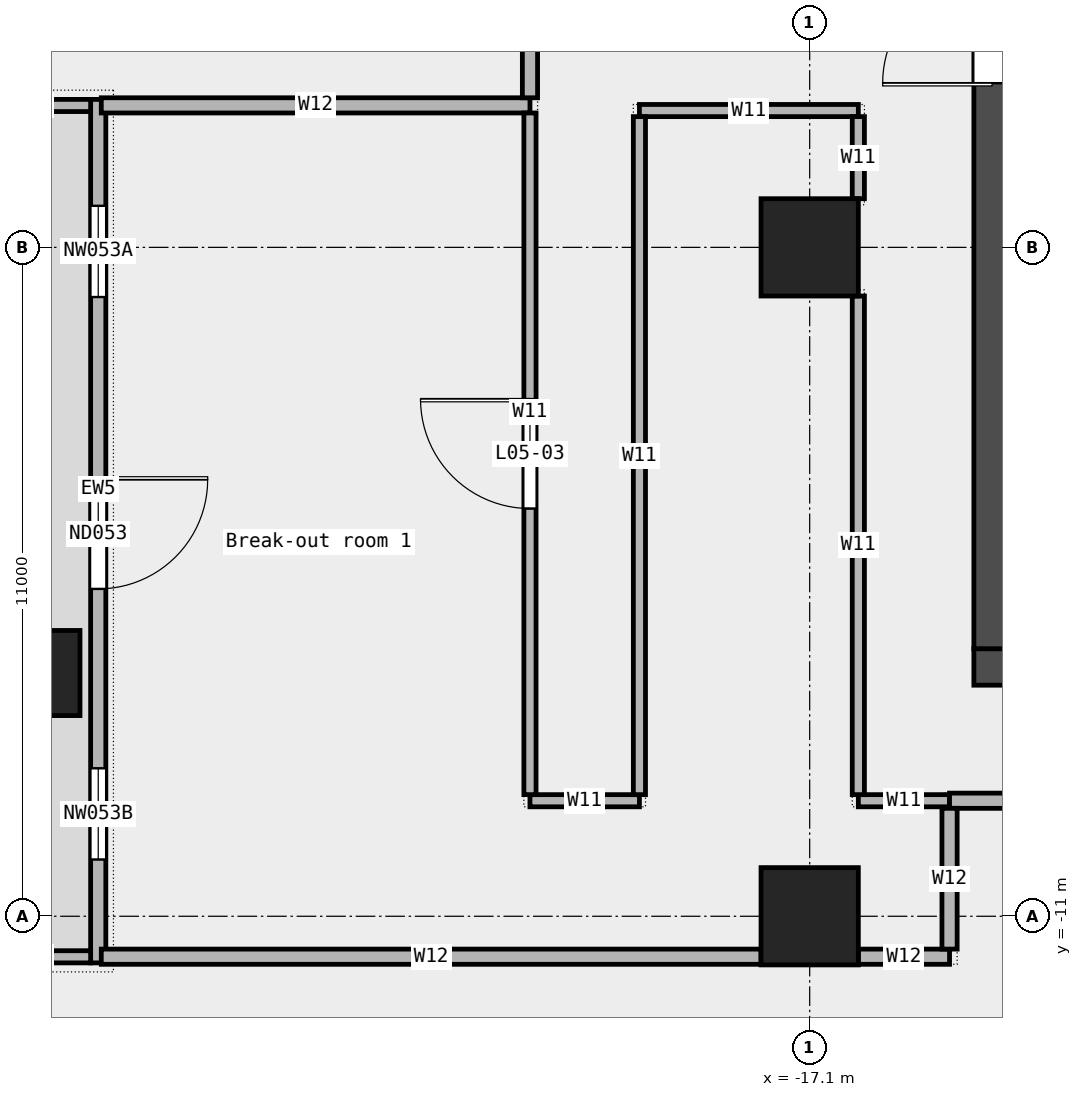
"""IFC4 building model, lengths in metres.
Left out: names, types, materials, properties, quantities, classifications, styles, units other than length and angle.
Written with IfcOpenShell. Run it as: python <this file> out.ifc"""

import sys

from ifc_helpers import new_model, si_unit, direction, frame, frame_2d, origin, origin_2d, place, context, subcontext, project, spatial, rectangle, extrude, element, fill, save


model = new_model("IFC4")
c1 = context("Model", 3, precision=1e-05, world=origin(), true_north=direction((0.0, 1.0)))
c2 = subcontext(c1, "Body", "Model", "MODEL_VIEW")
j1 = project(units=[si_unit("LENGTHUNIT", "METRE"), si_unit("PLANEANGLEUNIT", "RADIAN")], contexts=[c1])
p1 = place(None, origin())
s1 = spatial("IfcSite", under=j1, at=p1, CompositionType="ELEMENT")
p2 = place(p1, origin())
s2 = spatial("IfcBuilding", under=s1, at=p2, CompositionType="ELEMENT")
p3 = place(p2, frame((0.0, 0.0, 31.0)))
s3 = spatial("IfcBuildingStorey", under=s2, at=p3, CompositionType="ELEMENT", Elevation=31.0)
p4 = place(p3, frame((-29.8, -7.0, 0.0), z_axis=(0.0, 0.0, 1.0), x_axis=(1.0, 0.0, 0.0)))
e1 = element("IfcColumn", 1, at=p4, inside=s3, PredefinedType="COLUMN", context=c2, shape_type="SweptSolid", body=[
    extrude(rectangle(XDim=1.4, YDim=1.4, at=origin_2d()), origin(), (0.0, 0.0, 1.0), 4.35),
])
for number, where, z_axis, x_axis in (
    (2, (-17.1, -11.0, 0.0), (0.0, 0.0, 1.0), (1.0, 0.0, 0.0)),
    (3, (-17.1, 0.0, 0.0), (0.0, 0.0, 1.0), (1.0, 0.0, 0.0)),
):
    element("IfcColumn", number, at=place(p3, frame(where, z_axis=z_axis, x_axis=x_axis)), inside=s3, PredefinedType="COLUMN", context=c2, shape_type="SweptSolid", body=[
        extrude(rectangle(XDim=1.6, YDim=1.6, at=origin_2d()), origin(), (0.0, 0.0, 1.0), 4.35),
    ])
p5 = place(p3, frame((-28.8, 2.433, 0.0), z_axis=(0.0, 0.0, 1.0), x_axis=(0.0, -1.0, 0.0)))
e4 = element("IfcWall", 4, at=p5, inside=s3, PredefinedType="STANDARD", context=c2, shape_type="SweptSolid", body=[
    extrude(rectangle(XDim=14.2, YDim=0.25, at=frame_2d((7.1, 0.0))), origin(), (0.0, 0.0, 1.0), 4.35),
])
p6 = place(p5, frame((1.75, 0.0, 0.45)))
e5 = element("IfcOpeningElement", 5, at=p6, cuts=e4, PredefinedType="OPENING", context=c2, shape_type="SweptSolid", body=[
    extrude(rectangle(XDim=1.5, YDim=3.0, at=frame_2d((0.75, 1.5))), frame((0.0, 0.137, 0.0), z_axis=(0.0, -1.0, 0.0), x_axis=(1.0, 0.0, 0.0)), (0.0, 0.0, 1.0), 0.274),
])
p7 = place(p5, frame((6.25, 0.0, 0.0)))
e6 = element("IfcOpeningElement", 6, at=p7, cuts=e4, PredefinedType="OPENING", context=c2, shape_type="SweptSolid", body=[
    extrude(rectangle(XDim=1.8, YDim=2.4, at=frame_2d((0.9, 1.2))), frame((0.0, 0.137, 0.0), z_axis=(0.0, -1.0, 0.0), x_axis=(1.0, 0.0, 0.0)), (0.0, 0.0, 1.0), 0.274),
])
p8 = place(p5, frame((11.0, 0.0, 0.45)))
e7 = element("IfcOpeningElement", 7, at=p8, cuts=e4, PredefinedType="OPENING", context=c2, shape_type="SweptSolid", body=[
    extrude(rectangle(XDim=1.5, YDim=3.0, at=frame_2d((0.75, 1.5))), frame((0.0, 0.137, 0.0), z_axis=(0.0, -1.0, 0.0), x_axis=(1.0, 0.0, 0.0)), (0.0, 0.0, 1.0), 0.274),
])
for number, where, z_axis, x_axis in (
    (8, (-30.8, 2.333, 0.0), (0.0, 0.0, 1.0), (1.0, 0.0, 0.0)),
    (9, (-30.8, -11.667, 0.0), (0.0, 0.0, 1.0), (1.0, 0.0, 0.0)),
):
    element("IfcWall", number, at=place(p3, frame(where, z_axis=z_axis, x_axis=x_axis)), inside=s3, PredefinedType="STANDARD", context=c2, shape_type="SweptSolid", body=[
        extrude(rectangle(XDim=1.875, YDim=0.2, at=frame_2d((0.938, 0.0))), origin(), (0.0, 0.0, 1.0), 4.35),
    ])
p9 = place(p3, frame((-28.75, -11.665, 0.0), z_axis=(0.0, 0.0, 1.0), x_axis=(1.0, 0.0, 0.0)))
e10 = element("IfcWall", 10, at=p9, inside=s3, PredefinedType="PARTITIONING", context=c2, shape_type="SweptSolid", body=[
    extrude(rectangle(XDim=10.85, YDim=0.25, at=frame_2d((5.425, 0.0))), origin(), (0.0, 0.0, 1.0), 4.35),
])
p10 = place(p3, frame((-16.3, -11.665, 0.0), z_axis=(0.0, 0.0, 1.0), x_axis=(1.0, 0.0, 0.0)))
e11 = element("IfcWall", 11, at=p10, inside=s3, PredefinedType="PARTITIONING", context=c2, shape_type="SweptSolid", body=[
    extrude(rectangle(XDim=1.5, YDim=0.25, at=frame_2d((0.75, 0.0))), origin(), (0.0, 0.0, 1.0), 4.35),
])
p11 = place(p3, frame((-21.7, -9.1, 0.0), z_axis=(0.0, 0.0, 1.0), x_axis=(1.0, 0.0, 0.0)))
e12 = element("IfcWall", 12, at=p11, inside=s3, PredefinedType="PARTITIONING", context=c2, shape_type="SweptSolid", body=[
    extrude(rectangle(XDim=1.8, YDim=0.2, at=frame_2d((0.9, 0.0))), origin(), (0.0, 0.0, 1.0), 4.35),
])
p12 = place(p3, frame((-16.3, -9.1, 0.0), z_axis=(0.0, 0.0, 1.0), x_axis=(1.0, 0.0, 0.0)))
e13 = element("IfcWall", 13, at=p12, inside=s3, PredefinedType="PARTITIONING", context=c2, shape_type="SweptSolid", body=[
    extrude(rectangle(XDim=1.5, YDim=0.2, at=frame_2d((0.75, 0.0))), origin(), (0.0, 0.0, 1.0), 4.35),
])
p13 = place(p3, frame((-14.8, -9.1, 0.0), z_axis=(0.0, 0.0, 1.0), x_axis=(1.0, 0.0, 0.0)))
e14 = element("IfcWall", 14, at=p13, inside=s3, PredefinedType="PARTITIONING", context=c2, shape_type="SweptSolid", body=[
    extrude(rectangle(XDim=29.6, YDim=0.25, at=frame_2d((14.8, 0.0))), origin(), (0.0, 0.0, 1.0), 4.35),
])
p14 = place(p13, frame((22.998, 0.0, 0.0)))
e15 = element("IfcOpeningElement", 15, at=p14, cuts=e14, PredefinedType="OPENING", context=c2, shape_type="SweptSolid", body=[
    extrude(rectangle(XDim=1.8, YDim=2.1, at=frame_2d((0.9, 1.05))), frame((0.0, 0.137, 0.0), z_axis=(0.0, -1.0, 0.0), x_axis=(1.0, 0.0, 0.0)), (0.0, 0.0, 1.0), 0.274),
])
p15 = place(p13, frame((9.998, 0.0, 0.0)))
e16 = element("IfcOpeningElement", 16, at=p15, cuts=e14, PredefinedType="OPENING", context=c2, shape_type="SweptSolid", body=[
    extrude(rectangle(XDim=1.8, YDim=2.1, at=frame_2d((0.9, 1.05))), frame((0.0, 0.137, 0.0), z_axis=(0.0, -1.0, 0.0), x_axis=(1.0, 0.0, 0.0)), (0.0, 0.0, 1.0), 0.274),
])
p16 = place(p3, frame((-19.9, 2.25, 0.0), z_axis=(0.0, 0.0, 1.0), x_axis=(1.0, 0.0, 0.0)))
e17 = element("IfcWall", 17, at=p16, inside=s3, PredefinedType="PARTITIONING", context=c2, shape_type="SweptSolid", body=[
    extrude(rectangle(XDim=3.6, YDim=0.2, at=frame_2d((1.8, 0.0))), origin(), (0.0, 0.0, 1.0), 4.35),
])
p17 = place(p3, frame((-28.75, 2.335, 0.0), z_axis=(0.0, 0.0, 1.0), x_axis=(1.0, 0.0, 0.0)))
e18 = element("IfcWall", 18, at=p17, inside=s3, PredefinedType="PARTITIONING", context=c2, shape_type="SweptSolid", body=[
    extrude(rectangle(XDim=7.05, YDim=0.25, at=frame_2d((3.525, 0.0))), origin(), (0.0, 0.0, 1.0), 4.35),
])
p18 = place(p3, frame((-21.7, -9.0, 0.0), z_axis=(0.0, 0.0, 1.0), x_axis=(0.0, 1.0, 0.0)))
e19 = element("IfcWall", 19, at=p18, inside=s3, PredefinedType="PARTITIONING", context=c2, shape_type="SweptSolid", body=[
    extrude(rectangle(XDim=11.21, YDim=0.2, at=frame_2d((5.605, 0.0))), origin(), (0.0, 0.0, 1.0), 4.35),
])
p19 = place(p18, frame((4.705, 0.0, 0.0)))
e20 = element("IfcOpeningElement", 20, at=p19, cuts=e19, PredefinedType="OPENING", context=c2, shape_type="SweptSolid", body=[
    extrude(rectangle(XDim=1.8, YDim=2.1, at=frame_2d((0.9, 1.05))), frame((0.0, 0.112, 0.0), z_axis=(0.0, -1.0, 0.0), x_axis=(1.0, 0.0, 0.0)), (0.0, 0.0, 1.0), 0.224),
])
p20 = place(p3, frame((-21.7, 2.46, 0.0), z_axis=(0.0, 0.0, 1.0), x_axis=(0.0, 1.0, 0.0)))
e21 = element("IfcWall", 21, at=p20, inside=s3, PredefinedType="PARTITIONING", context=c2, shape_type="SweptSolid", body=[
    extrude(rectangle(XDim=12.79, YDim=0.25, at=frame_2d((6.395, 0.0))), origin(), (0.0, 0.0, 1.0), 4.35),
])
p21 = place(p20, frame((5.495, 0.0, 0.0)))
e22 = element("IfcOpeningElement", 22, at=p21, cuts=e21, PredefinedType="OPENING", context=c2, shape_type="SweptSolid", body=[
    extrude(rectangle(XDim=1.8, YDim=2.1, at=frame_2d((0.9, 1.05))), frame((0.0, 0.137, 0.0), z_axis=(0.0, -1.0, 0.0), x_axis=(1.0, 0.0, 0.0)), (0.0, 0.0, 1.0), 0.274),
])
p22 = place(p3, frame((-19.9, -9.0, 0.0), z_axis=(0.0, 0.0, 1.0), x_axis=(0.0, 1.0, 0.0)))
e23 = element("IfcWall", 23, at=p22, inside=s3, PredefinedType="PARTITIONING", context=c2, shape_type="SweptSolid", body=[
    extrude(rectangle(XDim=11.15, YDim=0.2, at=frame_2d((5.575, 0.0))), origin(), (0.0, 0.0, 1.0), 4.35),
])
p23 = place(p3, frame((-16.3, -9.0, 0.0), z_axis=(0.0, 0.0, 1.0), x_axis=(0.0, 1.0, 0.0)))
e24 = element("IfcWall", 24, at=p23, inside=s3, PredefinedType="PARTITIONING", context=c2, shape_type="SweptSolid", body=[
    extrude(rectangle(XDim=8.2, YDim=0.2, at=frame_2d((4.1, 0.0))), origin(), (0.0, 0.0, 1.0), 4.35),
])
p24 = place(p3, frame((-16.3, 0.8, 0.0), z_axis=(0.0, 0.0, 1.0), x_axis=(0.0, 1.0, 0.0)))
e25 = element("IfcWall", 25, at=p24, inside=s3, PredefinedType="PARTITIONING", context=c2, shape_type="SweptSolid", body=[
    extrude(rectangle(XDim=1.35, YDim=0.2, at=frame_2d((0.675, 0.0))), origin(), (0.0, 0.0, 1.0), 4.35),
])
p25 = place(p3, frame((-14.8, -11.54, 0.0), z_axis=(0.0, 0.0, 1.0), x_axis=(0.0, 1.0, 0.0)))
e26 = element("IfcWall", 26, at=p25, inside=s3, PredefinedType="PARTITIONING", context=c2, shape_type="SweptSolid", body=[
    extrude(rectangle(XDim=2.315, YDim=0.25, at=frame_2d((1.157, 0.0))), origin(), (0.0, 0.0, 1.0), 4.35),
])
p26 = place(p3, frame((-14.4, -6.9, 0.0), z_axis=(0.0, 0.0, 1.0), x_axis=(1.0, 0.0, 0.0)))
e27 = element("IfcWall", 27, at=p26, inside=s3, PredefinedType="SHEAR", context=c2, shape_type="SweptSolid", body=[
    extrude(rectangle(XDim=28.8, YDim=0.6, at=frame_2d((14.4, 0.0))), origin(), (0.0, 0.0, 1.0), 4.5),
])
p27 = place(p26, frame((4.337, 0.0, 0.0)))
e28 = element("IfcOpeningElement", 28, at=p27, cuts=e27, PredefinedType="OPENING", context=c2, shape_type="SweptSolid", body=[
    extrude(rectangle(XDim=1.0, YDim=2.1, at=frame_2d((0.5, 1.05))), frame((0.0, 0.312, 0.0), z_axis=(0.0, -1.0, 0.0), x_axis=(1.0, 0.0, 0.0)), (0.0, 0.0, 1.0), 0.624),
])
p28 = place(p26, frame((6.212, 0.0, 0.0)))
e29 = element("IfcOpeningElement", 29, at=p28, cuts=e27, PredefinedType="OPENING", context=c2, shape_type="SweptSolid", body=[
    extrude(rectangle(XDim=1.0, YDim=2.1, at=frame_2d((0.5, 1.05))), frame((0.0, 0.312, 0.0), z_axis=(0.0, -1.0, 0.0), x_axis=(1.0, 0.0, 0.0)), (0.0, 0.0, 1.0), 0.624),
])
p29 = place(p26, frame((10.8, 0.0, 0.0)))
e30 = element("IfcOpeningElement", 30, at=p29, cuts=e27, PredefinedType="OPENING", context=c2, shape_type="SweptSolid", body=[
    extrude(rectangle(XDim=1.2, YDim=2.1, at=frame_2d((0.6, 1.05))), frame((0.0, 0.312, 0.0), z_axis=(0.0, -1.0, 0.0), x_axis=(1.0, 0.0, 0.0)), (0.0, 0.0, 1.0), 0.624),
])
p30 = place(p26, frame((15.587, 0.0, 0.0)))
e31 = element("IfcOpeningElement", 31, at=p30, cuts=e27, PredefinedType="OPENING", context=c2, shape_type="SweptSolid", body=[
    extrude(rectangle(XDim=1.0, YDim=2.1, at=frame_2d((0.5, 1.05))), frame((0.0, 0.312, 0.0), z_axis=(0.0, -1.0, 0.0), x_axis=(1.0, 0.0, 0.0)), (0.0, 0.0, 1.0), 0.624),
])
p31 = place(p26, frame((18.75, 0.0, 0.0)))
e32 = element("IfcOpeningElement", 32, at=p31, cuts=e27, PredefinedType="OPENING", context=c2, shape_type="SweptSolid", body=[
    extrude(rectangle(XDim=1.8, YDim=2.1, at=frame_2d((0.9, 1.05))), frame((0.0, 0.312, 0.0), z_axis=(0.0, -1.0, 0.0), x_axis=(1.0, 0.0, 0.0)), (0.0, 0.0, 1.0), 0.624),
])
p32 = place(p26, frame((23.087, 0.0, 0.0)))
e33 = element("IfcOpeningElement", 33, at=p32, cuts=e27, PredefinedType="OPENING", context=c2, shape_type="SweptSolid", body=[
    extrude(rectangle(XDim=1.0, YDim=2.1, at=frame_2d((0.5, 1.05))), frame((0.0, 0.312, 0.0), z_axis=(0.0, -1.0, 0.0), x_axis=(1.0, 0.0, 0.0)), (0.0, 0.0, 1.0), 0.624),
])
p33 = place(p3, frame((-14.1, -6.6, 0.0), z_axis=(0.0, 0.0, 1.0), x_axis=(0.0, 1.0, 0.0)))
e34 = element("IfcWall", 34, at=p33, inside=s3, PredefinedType="SHEAR", context=c2, shape_type="SweptSolid", body=[
    extrude(rectangle(XDim=19.5, YDim=0.6, at=frame_2d((9.75, 0.0))), origin(), (0.0, 0.0, 1.0), 4.5),
])
p34 = place(p33, frame((9.3, 0.0, 0.0)))
e35 = element("IfcOpeningElement", 35, at=p34, cuts=e34, PredefinedType="OPENING", context=c2, shape_type="SweptSolid", body=[
    extrude(rectangle(XDim=1.8, YDim=2.1, at=frame_2d((0.9, 1.05))), frame((0.0, 0.312, 0.0), z_axis=(0.0, -1.0, 0.0), x_axis=(1.0, 0.0, 0.0)), (0.0, 0.0, 1.0), 0.624),
])
p35 = place(p6, origin())
e36 = element("IfcWindow", 36, at=p35, inside=s3, PartitioningType="SINGLE_PANEL", PredefinedType="WINDOW", context=c2, shape_type="SweptSolid", body=[
    extrude(rectangle(XDim=1.5, YDim=3.0, at=frame_2d((0.75, 1.5))), frame((0.0, 0.03, 0.0), z_axis=(0.0, -1.0, 0.0), x_axis=(1.0, 0.0, 0.0)), (0.0, 0.0, 1.0), 0.06),
])
fill(e5, e36)
p36 = place(p7, origin())
e37 = element("IfcDoor", 37, at=p36, inside=s3, OperationType="DOUBLE_DOOR_SINGLE_SWING", PredefinedType="DOOR", context=c2, shape_type="SweptSolid", body=[
    extrude(rectangle(XDim=1.8, YDim=2.4, at=frame_2d((0.9, 1.2))), frame((0.0, 0.025, 0.0), z_axis=(0.0, -1.0, 0.0), x_axis=(1.0, 0.0, 0.0)), (0.0, 0.0, 1.0), 0.05),
])
fill(e6, e37)
p37 = place(p8, origin())
e38 = element("IfcWindow", 38, at=p37, inside=s3, PartitioningType="SINGLE_PANEL", PredefinedType="WINDOW", context=c2, shape_type="SweptSolid", body=[
    extrude(rectangle(XDim=1.5, YDim=3.0, at=frame_2d((0.75, 1.5))), frame((0.0, 0.03, 0.0), z_axis=(0.0, -1.0, 0.0), x_axis=(1.0, 0.0, 0.0)), (0.0, 0.0, 1.0), 0.06),
])
fill(e7, e38)
p38 = place(p19, origin())
e39 = element("IfcDoor", 39, at=p38, inside=s3, OperationType="DOUBLE_DOOR_SINGLE_SWING", PredefinedType="DOOR", context=c2, shape_type="SweptSolid", body=[
    extrude(rectangle(XDim=1.8, YDim=2.1, at=frame_2d((0.9, 1.05))), frame((0.0, 0.025, 0.0), z_axis=(0.0, -1.0, 0.0), x_axis=(1.0, 0.0, 0.0)), (0.0, 0.0, 1.0), 0.05),
])
fill(e20, e39)
p39 = place(p34, origin())
e40 = element("IfcDoor", 40, at=p39, inside=s3, OperationType="DOUBLE_DOOR_SINGLE_SWING", PredefinedType="DOOR", context=c2, shape_type="SweptSolid", body=[
    extrude(rectangle(XDim=1.8, YDim=2.1, at=frame_2d((0.9, 1.05))), frame((0.0, 0.025, 0.0), z_axis=(0.0, -1.0, 0.0), x_axis=(1.0, 0.0, 0.0)), (0.0, 0.0, 1.0), 0.05),
])
fill(e35, e40)
save(model, sys.argv[1])
